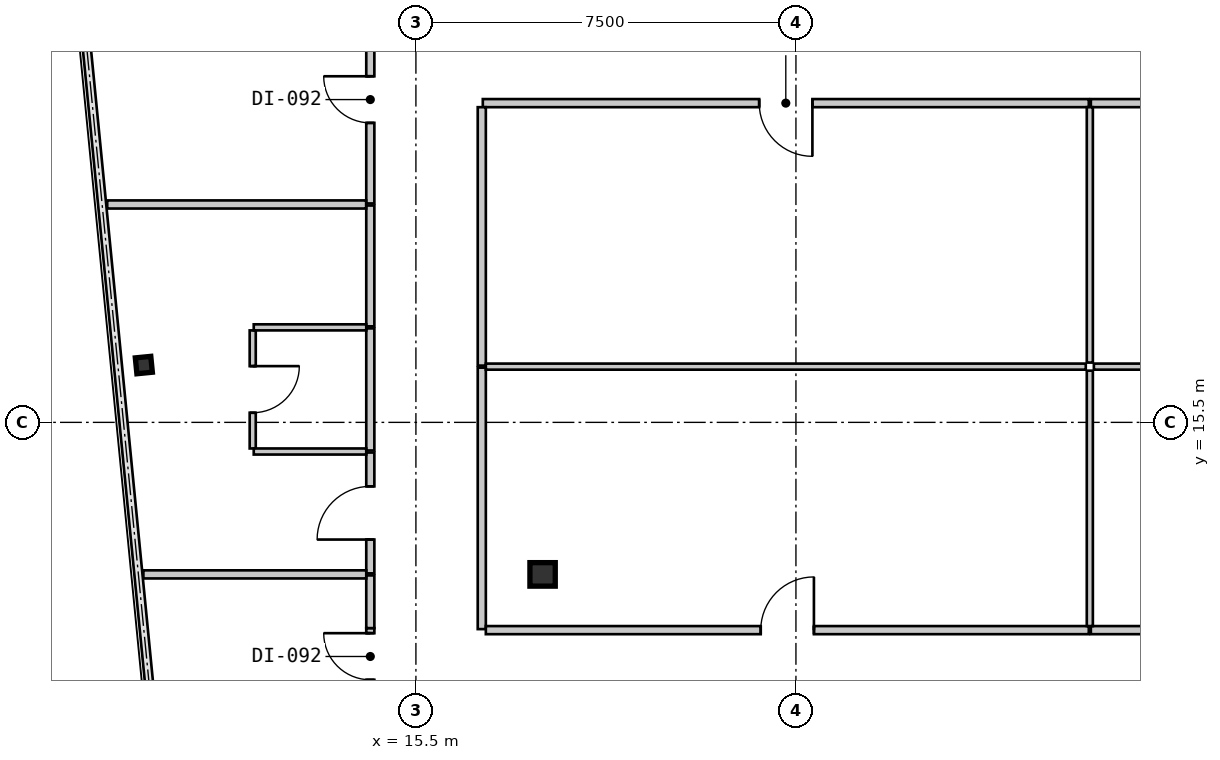
"""IFC4 building model, lengths in metres.
Left out: names, types, materials, properties, quantities, classifications, styles, units other than length and angle.
Written with IfcOpenShell. Run it as: python <this file> out.ifc"""

import sys

from ifc_helpers import new_model, si_unit, direction, frame, frame_2d, origin, origin_2d, place, context, subcontext, project, spatial, rectangle, i_section, extrude, source, transform, mapped, element, fill, save


model = new_model("IFC4")
c1 = context("Model", 3, precision=1e-05, world=origin(), true_north=direction((0.0, 1.0)))
c2 = subcontext(c1, "Body", "Model", "MODEL_VIEW")
j1 = project(units=[si_unit("LENGTHUNIT", "METRE"), si_unit("PLANEANGLEUNIT", "RADIAN")], contexts=[c1])
p1 = place(None, origin())
s1 = spatial("IfcSite", under=j1, at=p1, CompositionType="ELEMENT")
p2 = place(p1, origin())
s2 = spatial("IfcBuilding", under=s1, at=p2, CompositionType="ELEMENT")
p3 = place(p2, frame((0.0, 0.0, 99.75)))
s3 = spatial("IfcBuildingStorey", under=s2, at=p3, CompositionType="ELEMENT", Elevation=99.75)
m1 = source(origin(), c2, "Body", "SweptSolid", [
    extrude(i_section(OverallWidth=0.5, OverallDepth=0.464, WebThickness=0.022, FlangeThickness=0.034, at=origin_2d()), origin(), (0.0, 0.0, 1.0), 3.15),
])
p4 = place(p3, frame((18.0, 12.5, 0.0), z_axis=(0.0, 0.0, 1.0), x_axis=(1.0, 0.0, 0.0)))
e1 = element("IfcColumn", 1, at=p4, inside=s3, PredefinedType="COLUMN", context=c2, shape_type="MappedRepresentation", body=[
    mapped(m1, transform((0.0, 0.0, 0.0), scale=1.0)),
])
m2 = source(origin(), c2, "Body", "SweptSolid", [
    extrude(i_section(OverallWidth=0.307, OverallDepth=0.315, WebThickness=0.012, FlangeThickness=0.019, at=origin_2d()), origin(), (0.0, 0.0, 1.0), 3.15),
])
p5 = place(p3, frame((10.131, 16.631, 0.0), z_axis=(0.0, 0.0, 1.0), x_axis=(0.995227399982, 0.097582899759, 0.0)))
e2 = element("IfcColumn", 2, at=p5, inside=s3, PredefinedType="COLUMN", context=c2, shape_type="MappedRepresentation", body=[
    mapped(m2, transform((0.0, 0.0, 0.0), scale=1.0)),
])
m3 = source(origin(), c2, "Body", "SweptSolid", [
    extrude(rectangle(XDim=5.16, YDim=0.16, at=frame_2d((2.58, 0.0))), origin(), (0.0, 0.0, 1.0), 2.93),
])
p6 = place(p3, frame((16.8, 16.58, 0.0), z_axis=(0.0, 0.0, 1.0), x_axis=(0.0, -1.0, 0.0)))
e3 = element("IfcWall", 3, at=p6, inside=s3, PredefinedType="PARTITIONING", context=c2, shape_type="MappedRepresentation", body=[
    mapped(m3, transform((0.0, 0.0, 0.0), scale=1.0)),
])
m4 = source(origin(), c2, "Body", "SweptSolid", [
    extrude(rectangle(XDim=11.959, YDim=0.16, at=frame_2d((5.98, 0.0))), origin(), (0.0, 0.0, 1.0), 2.93),
])
p7 = place(p3, frame((28.78, 21.8, 0.0), z_axis=(0.0, 0.0, 1.0), x_axis=(-1.0, 0.0, 0.0)))
e4 = element("IfcWall", 4, at=p7, inside=s3, PredefinedType="PARTITIONING", context=c2, shape_type="MappedRepresentation", body=[
    mapped(m4, transform((0.0, 0.0, 0.0), scale=1.0)),
])
m5 = source(origin(), c2, "Body", "SweptSolid", [
    extrude(rectangle(XDim=1.05, YDim=2.1, at=frame_2d((0.525, 1.05))), frame((0.0, 0.09, 0.0), z_axis=(0.0, -1.0, 0.0), x_axis=(1.0, 0.0, 0.0)), (0.0, 0.0, 1.0), 0.18),
])
p8 = place(p7, frame((5.455, 0.0, 0.0)))
e5 = element("IfcOpeningElement", 5, at=p8, cuts=e4, PredefinedType="OPENING", context=c2, shape_type="MappedRepresentation", body=[
    mapped(m5, transform((0.0, 0.0, 0.0), scale=1.0)),
])
m6 = source(origin(), c2, "Body", "SweptSolid", [
    extrude(rectangle(XDim=5.1, YDim=0.16, at=frame_2d((2.55, 0.0))), origin(), (0.0, 0.0, 1.0), 2.93),
])
p9 = place(p3, frame((16.8, 21.72, 0.0), z_axis=(0.0, 0.0, 1.0), x_axis=(0.0, -1.0, 0.0)))
e6 = element("IfcWall", 6, at=p9, inside=s3, PredefinedType="PARTITIONING", context=c2, shape_type="MappedRepresentation", body=[
    mapped(m6, transform((0.0, 0.0, 0.0), scale=1.0)),
])
m7 = source(origin(), c2, "Body", "SweptSolid", [
    extrude(rectangle(XDim=12.159, YDim=0.16, at=frame_2d((6.08, 0.0))), origin(), (0.0, 0.0, 1.0), 2.93),
])
p10 = place(p3, frame((40.98, 21.8, 0.0), z_axis=(0.0, 0.0, 1.0), x_axis=(-1.0, 0.0, 0.0)))
e7 = element("IfcWall", 7, at=p10, inside=s3, PredefinedType="PARTITIONING", context=c2, shape_type="MappedRepresentation", body=[
    mapped(m7, transform((0.0, 0.0, 0.0), scale=1.0)),
])
p11 = place(p10, frame((5.555, 0.0, 0.0)))
e8 = element("IfcOpeningElement", 8, at=p11, cuts=e7, PredefinedType="OPENING", context=c2, shape_type="MappedRepresentation", body=[
    mapped(m5, transform((0.0, 0.0, 0.0), scale=1.0)),
])
m8 = source(origin(), c2, "Body", "SweptSolid", [
    extrude(rectangle(XDim=2.16, YDim=0.16, at=frame_2d((1.08, 0.0))), origin(), (0.0, 0.0, 1.0), 2.623),
])
p12 = place(p3, frame((14.6, 9.28, 0.0), z_axis=(0.0, 0.0, 1.0), x_axis=(0.0, 1.0, 0.0)))
e9 = element("IfcWall", 9, at=p12, inside=s3, PredefinedType="PARTITIONING", context=c2, shape_type="MappedRepresentation", body=[
    mapped(m8, transform((0.0, 0.0, 0.0), scale=1.0)),
])
m9 = source(origin(), c2, "Body", "SweptSolid", [
    extrude(rectangle(XDim=0.92, YDim=2.1, at=frame_2d((0.46, 1.05))), frame((0.0, 0.09, 0.0), z_axis=(0.0, -1.0, 0.0), x_axis=(1.0, 0.0, 0.0)), (0.0, 0.0, 1.0), 0.18),
])
p13 = place(p12, frame((1.14, 0.0, 0.0)))
e10 = element("IfcOpeningElement", 10, at=p13, cuts=e9, PredefinedType="OPENING", context=c2, shape_type="MappedRepresentation", body=[
    mapped(m9, transform((0.0, 0.0, 0.0), scale=1.0)),
])
m10 = source(origin(), c2, "Body", "SweptSolid", [
    extrude(rectangle(XDim=1.04, YDim=0.16, at=frame_2d((0.52, 0.0))), origin(), (0.0, 0.0, 1.0), 2.93),
])
p14 = place(p3, frame((14.6, 11.44, 0.0), z_axis=(0.0, 0.0, 1.0), x_axis=(0.0, 1.0, 0.0)))
e11 = element("IfcWall", 11, at=p14, inside=s3, PredefinedType="PARTITIONING", context=c2, shape_type="MappedRepresentation", body=[
    mapped(m10, transform((0.0, 0.0, 0.0), scale=1.0)),
])
m11 = source(origin(), c2, "Body", "SweptSolid", [
    extrude(rectangle(XDim=2.385, YDim=0.16, at=frame_2d((1.192, 0.0))), origin(), (0.0, 0.0, 1.0), 2.93),
])
p15 = place(p3, frame((14.6, 12.52, 0.0), z_axis=(0.0, 0.0, 1.0), x_axis=(0.0, 1.0, 0.0)))
e12 = element("IfcWall", 12, at=p15, inside=s3, PredefinedType="PARTITIONING", context=c2, shape_type="MappedRepresentation", body=[
    mapped(m11, transform((0.0, 0.0, 0.0), scale=1.0)),
])
p16 = place(p15, frame((0.667, 0.0, 0.0)))
e13 = element("IfcOpeningElement", 13, at=p16, cuts=e12, PredefinedType="OPENING", context=c2, shape_type="MappedRepresentation", body=[
    mapped(m5, transform((0.0, 0.0, 0.0), scale=1.0)),
])
p17 = place(p3, frame((14.6, 17.395, 0.0), z_axis=(0.0, 0.0, 1.0), x_axis=(0.0, 1.0, 0.0)))
e14 = element("IfcWall", 14, at=p17, inside=s3, PredefinedType="PARTITIONING", context=c2, shape_type="MappedRepresentation", body=[
    mapped(m11, transform((0.0, 0.0, 0.0), scale=1.0)),
])
m12 = source(origin(), c2, "Body", "SweptSolid", [
    extrude(rectangle(XDim=2.409, YDim=0.16, at=frame_2d((1.205, 0.0))), origin(), (0.0, 0.0, 1.0), 2.93),
])
p18 = place(p3, frame((14.6, 14.945, 0.0), z_axis=(0.0, 0.0, 1.0), x_axis=(0.0, 1.0, 0.0)))
e15 = element("IfcWall", 15, at=p18, inside=s3, PredefinedType="PARTITIONING", context=c2, shape_type="MappedRepresentation", body=[
    mapped(m12, transform((0.0, 0.0, 0.0), scale=1.0)),
])
m13 = source(origin(), c2, "Body", "SweptSolid", [
    extrude(rectangle(XDim=4.1, YDim=0.16, at=frame_2d((2.05, 0.0))), origin(), (0.0, 0.0, 1.0), 2.93),
])
p19 = place(p3, frame((14.6, 19.82, 0.0), z_axis=(0.0, 0.0, 1.0), x_axis=(0.0, 1.0, 0.0)))
e16 = element("IfcWall", 16, at=p19, inside=s3, PredefinedType="PARTITIONING", context=c2, shape_type="MappedRepresentation", body=[
    mapped(m13, transform((0.0, 0.0, 0.0), scale=1.0)),
])
p20 = place(p19, frame((1.59, 0.0, 0.0)))
e17 = element("IfcOpeningElement", 17, at=p20, cuts=e16, PredefinedType="OPENING", context=c2, shape_type="MappedRepresentation", body=[
    mapped(m9, transform((0.0, 0.0, 0.0), scale=1.0)),
])
m14 = source(origin(), c2, "Body", "SweptSolid", [
    extrude(rectangle(XDim=11.9, YDim=0.16, at=frame_2d((5.95, 0.0))), origin(), (0.0, 0.0, 1.0), 2.93),
])
p21 = place(p3, frame((16.88, 11.4, 0.0), z_axis=(0.0, 0.0, 1.0), x_axis=(1.0, 0.0, 0.0)))
e18 = element("IfcWall", 18, at=p21, inside=s3, PredefinedType="PARTITIONING", context=c2, shape_type="MappedRepresentation", body=[
    mapped(m14, transform((0.0, 0.0, 0.0), scale=1.0)),
])
p22 = place(p21, frame((5.425, 0.0, 0.0)))
e19 = element("IfcOpeningElement", 19, at=p22, cuts=e18, PredefinedType="OPENING", context=c2, shape_type="MappedRepresentation", body=[
    mapped(m5, transform((0.0, 0.0, 0.0), scale=1.0)),
])
p23 = place(p3, frame((28.82, 11.4, 0.0), z_axis=(0.0, 0.0, 1.0), x_axis=(1.0, 0.0, 0.0)))
e20 = element("IfcWall", 20, at=p23, inside=s3, PredefinedType="PARTITIONING", context=c2, shape_type="MappedRepresentation", body=[
    mapped(m7, transform((0.0, 0.0, 0.0), scale=1.0)),
])
p24 = place(p23, frame((5.555, 0.0, 0.0)))
e21 = element("IfcOpeningElement", 21, at=p24, cuts=e20, PredefinedType="OPENING", context=c2, shape_type="MappedRepresentation", body=[
    mapped(m5, transform((0.0, 0.0, 0.0), scale=1.0)),
])
m15 = source(origin(), c2, "Body", "SweptSolid", [
    extrude(rectangle(XDim=11.84, YDim=0.12, at=frame_2d((5.92, 0.0))), origin(), (0.0, 0.0, 1.0), 2.93),
])
p25 = place(p3, frame((16.88, 16.6, 0.0), z_axis=(0.0, 0.0, 1.0), x_axis=(1.0, 0.0, 0.0)))
e22 = element("IfcWall", 22, at=p25, inside=s3, PredefinedType="PARTITIONING", context=c2, shape_type="MappedRepresentation", body=[
    mapped(m15, transform((0.0, 0.0, 0.0), scale=1.0)),
])
m16 = source(origin(), c2, "Body", "SweptSolid", [
    extrude(rectangle(XDim=5.04, YDim=0.12, at=frame_2d((2.52, 0.0))), origin(), (0.0, 0.0, 1.0), 2.93),
])
for number, where, z_axis, x_axis in (
    (23, (28.8, 16.52, 0.0), (0.0, 0.0, 1.0), (0.0, -1.0, 0.0)),
    (24, (28.8, 21.72, 0.0), (0.0, 0.0, 1.0), (0.0, -1.0, 0.0)),
):
    element("IfcWall", number, at=place(p3, frame(where, z_axis=z_axis, x_axis=x_axis)), inside=s3, PredefinedType="PARTITIONING", context=c2, shape_type="MappedRepresentation", body=[
        mapped(m16, transform((0.0, 0.0, 0.0), scale=1.0)),
    ])
m17 = source(origin(), c2, "Body", "SweptSolid", [
    extrude(rectangle(XDim=12.04, YDim=0.12, at=frame_2d((6.02, 0.0))), origin(), (0.0, 0.0, 1.0), 2.93),
])
p26 = place(p3, frame((28.88, 16.6, 0.0), z_axis=(0.0, 0.0, 1.0), x_axis=(1.0, 0.0, 0.0)))
e25 = element("IfcWall", 25, at=p26, inside=s3, PredefinedType="PARTITIONING", context=c2, shape_type="MappedRepresentation", body=[
    mapped(m17, transform((0.0, 0.0, 0.0), scale=1.0)),
])
m18 = source(origin(), c2, "Body", "SweptSolid", [
    extrude(rectangle(XDim=4.399, YDim=0.16, at=frame_2d((2.199, 0.0))), origin(), (0.0, 0.0, 1.0), 2.93),
])
p27 = place(p3, frame((10.121, 12.5, 0.0), z_axis=(0.0, 0.0, 1.0), x_axis=(1.0, 0.0, 0.0)))
e26 = element("IfcWall", 26, at=p27, inside=s3, PredefinedType="PARTITIONING", context=c2, shape_type="MappedRepresentation", body=[
    mapped(m18, transform((0.0, 0.0, 0.0), scale=1.0)),
])
m19 = source(origin(), c2, "Body", "SweptSolid", [
    extrude(rectangle(XDim=2.33, YDim=0.12, at=frame_2d((1.165, 0.0))), origin(), (0.0, 0.0, 1.0), 2.93),
])
p28 = place(p3, frame((12.279, 17.315, 0.0), z_axis=(0.0, 0.0, 1.0), x_axis=(0.0, -1.0, 0.0)))
e27 = element("IfcWall", 27, at=p28, inside=s3, PredefinedType="PARTITIONING", context=c2, shape_type="MappedRepresentation", body=[
    mapped(m19, transform((0.0, 0.0, 0.0), scale=1.0)),
])
m20 = source(origin(), c2, "Body", "SweptSolid", [
    extrude(rectangle(XDim=0.92, YDim=2.1, at=frame_2d((0.46, 1.05))), frame((0.0, 0.07, 0.0), z_axis=(0.0, -1.0, 0.0), x_axis=(1.0, 0.0, 0.0)), (0.0, 0.0, 1.0), 0.14),
])
p29 = place(p28, frame((0.705, 0.0, 0.0)))
e28 = element("IfcOpeningElement", 28, at=p29, cuts=e27, PredefinedType="OPENING", context=c2, shape_type="MappedRepresentation", body=[
    mapped(m20, transform((0.0, 0.0, 0.0), scale=1.0)),
])
m21 = source(origin(), c2, "Body", "SweptSolid", [
    extrude(rectangle(XDim=2.221, YDim=0.12, at=frame_2d((1.11, 0.0))), origin(), (0.0, 0.0, 1.0), 2.93),
])
for number, where, z_axis, x_axis in (
    (29, (14.52, 17.375, 0.0), (0.0, 0.0, 1.0), (-1.0, 0.0, 0.0)),
    (30, (12.299, 14.925, 0.0), (0.0, 0.0, 1.0), (1.0, 0.0, 0.0)),
):
    element("IfcWall", number, at=place(p3, frame(where, z_axis=z_axis, x_axis=x_axis)), inside=s3, PredefinedType="PARTITIONING", context=c2, shape_type="MappedRepresentation", body=[
        mapped(m21, transform((0.0, 0.0, 0.0), scale=1.0)),
    ])
m22 = source(origin(), c2, "Body", "SweptSolid", [
    extrude(rectangle(XDim=5.11, YDim=0.16, at=frame_2d((2.555, 0.0))), origin(), (0.0, 0.0, 1.0), 2.93),
])
p30 = place(p3, frame((9.408, 19.8, 0.0), z_axis=(0.0, 0.0, 1.0), x_axis=(1.0, 0.0, 0.0)))
e31 = element("IfcWall", 31, at=p30, inside=s3, PredefinedType="PARTITIONING", context=c2, shape_type="MappedRepresentation", body=[
    mapped(m22, transform((0.0, 0.0, 0.0), scale=1.0)),
])
m23 = source(origin(), c2, "Body", "SweptSolid", [
    extrude(rectangle(XDim=1.05, YDim=2.1, at=frame_2d((0.525, 1.05))), frame((0.0, 0.025, 0.0), z_axis=(0.0, -1.0, 0.0), x_axis=(1.0, 0.0, 0.0)), (0.0, 0.0, 1.0), 0.05),
])
p31 = place(p8, origin())
e32 = element("IfcDoor", 32, at=p31, inside=s3, OperationType="SINGLE_SWING_LEFT", PredefinedType="DOOR", context=c2, shape_type="MappedRepresentation", body=[
    mapped(m23, transform((0.0, 0.0, 0.0), scale=1.0)),
])
fill(e5, e32)
m24 = source(origin(), c2, "Body", "SweptSolid", [
    extrude(rectangle(XDim=0.92, YDim=2.1, at=frame_2d((0.46, 1.05))), frame((0.0, 0.025, 0.0), z_axis=(0.0, -1.0, 0.0), x_axis=(1.0, 0.0, 0.0)), (0.0, 0.0, 1.0), 0.05),
])
p32 = place(p13, origin())
e33 = element("IfcDoor", 33, at=p32, inside=s3, OperationType="SINGLE_SWING_RIGHT", PredefinedType="DOOR", context=c2, shape_type="MappedRepresentation", body=[
    mapped(m24, transform((0.0, 0.0, 0.0), scale=1.0)),
])
fill(e10, e33)
p33 = place(p16, origin())
e34 = element("IfcDoor", 34, at=p33, inside=s3, OperationType="SINGLE_SWING_LEFT", PredefinedType="DOOR", context=c2, shape_type="MappedRepresentation", body=[
    mapped(m23, transform((0.0, 0.0, 0.0), scale=1.0)),
])
fill(e13, e34)
p34 = place(p20, origin())
e35 = element("IfcDoor", 35, at=p34, inside=s3, OperationType="SINGLE_SWING_RIGHT", PredefinedType="DOOR", context=c2, shape_type="MappedRepresentation", body=[
    mapped(m24, transform((0.0, 0.0, 0.0), scale=1.0)),
])
fill(e17, e35)
p35 = place(p22, origin())
e36 = element("IfcDoor", 36, at=p35, inside=s3, OperationType="SINGLE_SWING_RIGHT", PredefinedType="DOOR", context=c2, shape_type="MappedRepresentation", body=[
    mapped(m23, transform((0.0, 0.0, 0.0), scale=1.0)),
])
fill(e19, e36)
p36 = place(p29, origin())
e37 = element("IfcDoor", 37, at=p36, inside=s3, OperationType="SINGLE_SWING_LEFT", PredefinedType="DOOR", context=c2, shape_type="MappedRepresentation", body=[
    mapped(m24, transform((0.0, 0.0, 0.0), scale=1.0)),
])
fill(e28, e37)
save(model, sys.argv[1])
